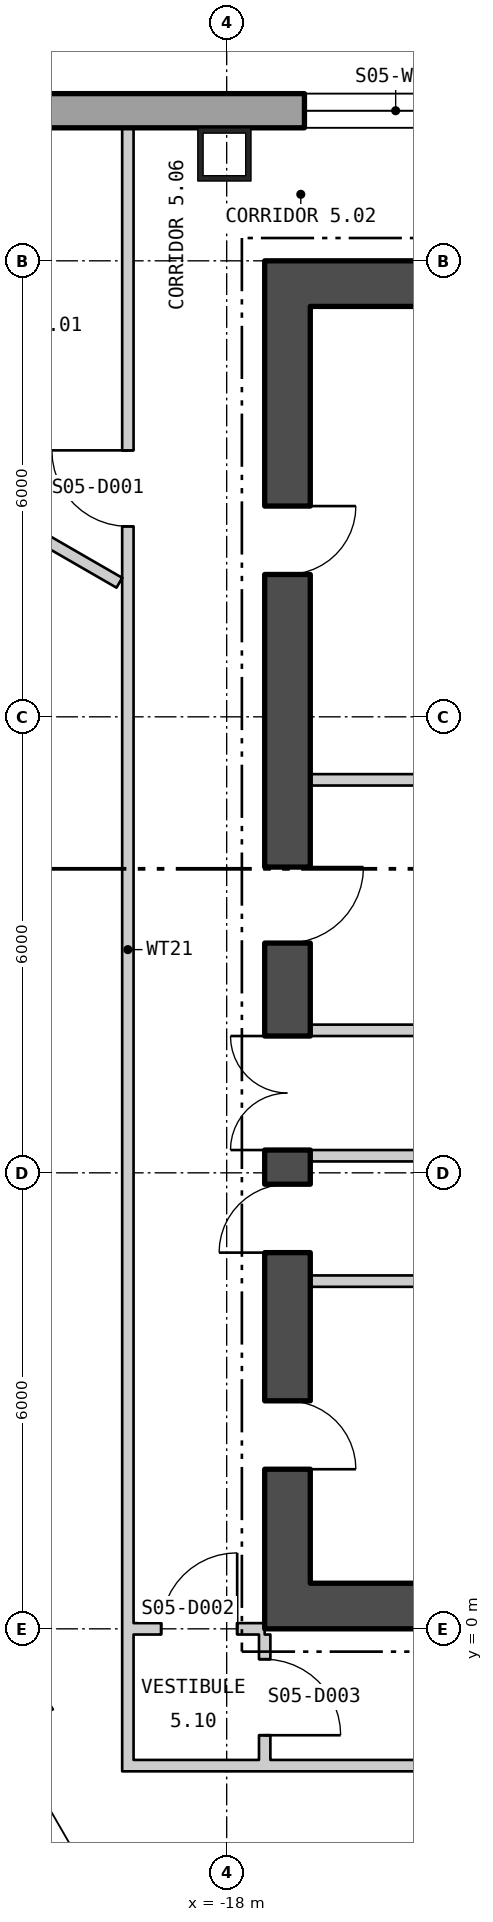
"""IFC4 building model, lengths in metres.
Left out: names, types, materials, properties, quantities, classifications, styles, units other than length and angle.
Written with IfcOpenShell. Run it as: python <this file> out.ifc"""

import sys

from ifc_helpers import new_model, si_unit, direction, frame, frame_2d, origin, origin_2d, place, context, subcontext, project, spatial, polyline, rectangle, hollow_rectangle, outline, extrude, element, fill, save


model = new_model("IFC4")
c1 = context("Model", 3, precision=1e-05, world=origin(), true_north=direction((0.0, 1.0)))
c2 = subcontext(c1, "Body", "Model", "MODEL_VIEW")
j1 = project(units=[si_unit("LENGTHUNIT", "METRE"), si_unit("PLANEANGLEUNIT", "RADIAN")], contexts=[c1])
p1 = place(None, origin())
s1 = spatial("IfcSite", under=j1, at=p1, CompositionType="ELEMENT")
p2 = place(p1, origin())
s2 = spatial("IfcBuilding", under=s1, at=p2, CompositionType="ELEMENT")
p3 = place(p2, frame((0.0, 0.0, 69.3)))
s3 = spatial("IfcBuildingStorey", under=s2, at=p3, CompositionType="ELEMENT", Elevation=69.3)
for number, where, z_axis, x_axis in (
    (1, (-18.03, 19.4, 0.0), (0.0, 0.0, 1.0), (-1.0, 0.0, 0.0)),
    (2, (-20.755, -0.934, 0.0), (0.0, 0.0, 1.0), (0.5, -0.866, 0.0)),
):
    element("IfcColumn", number, at=place(p3, frame(where, z_axis=z_axis, x_axis=x_axis)), inside=s3, PredefinedType="COLUMN", context=c2, shape_type="SweptSolid", body=[
        extrude(hollow_rectangle(XDim=0.7, YDim=0.7, WallThickness=0.07, at=origin_2d()), origin(), (0.0, 0.0, 1.0), 4.5),
    ])
p4 = place(p3, frame((22.87, 19.975, -0.4), z_axis=(0.0, 0.0, 1.0), x_axis=(-1.0, 0.0, 0.0)))
e3 = element("IfcWall", 3, at=p4, inside=s3, PredefinedType="SOLIDWALL", context=c2, shape_type="SweptSolid", body=[
    extrude(outline(polyline([(-0.13, -0.225), (45.87, -0.225), (45.61, 0.225), (0.13, 0.225), (-0.13, -0.225)])), origin(), (0.0, 0.0, 1.0), 4.5),
])
p5 = place(p4, frame((5.893, 0.0, 1.3)))
e4 = element("IfcOpeningElement", 4, at=p5, cuts=e3, PredefinedType="OPENING", context=c2, shape_type="SweptSolid", body=[
    extrude(rectangle(XDim=2.4, YDim=2.6, at=frame_2d((1.2, 1.3))), frame((0.0, 0.235, 0.0), z_axis=(0.0, -1.0, 0.0), x_axis=(1.0, 0.0, 0.0)), (0.0, 0.0, 1.0), 0.47),
])
p6 = place(p4, frame((10.401, 0.0, 1.3)))
e5 = element("IfcOpeningElement", 5, at=p6, cuts=e3, PredefinedType="OPENING", context=c2, shape_type="SweptSolid", body=[
    extrude(rectangle(XDim=2.4, YDim=2.6, at=frame_2d((1.2, 1.3))), frame((0.0, 0.235, 0.0), z_axis=(0.0, -1.0, 0.0), x_axis=(1.0, 0.0, 0.0)), (0.0, 0.0, 1.0), 0.47),
])
p7 = place(p4, frame((14.909, 0.0, 1.3)))
e6 = element("IfcOpeningElement", 6, at=p7, cuts=e3, PredefinedType="OPENING", context=c2, shape_type="SweptSolid", body=[
    extrude(rectangle(XDim=2.4, YDim=2.6, at=frame_2d((1.2, 1.3))), frame((0.0, 0.235, 0.0), z_axis=(0.0, -1.0, 0.0), x_axis=(1.0, 0.0, 0.0)), (0.0, 0.0, 1.0), 0.47),
])
p8 = place(p4, frame((19.416, 0.0, 1.3)))
e7 = element("IfcOpeningElement", 7, at=p8, cuts=e3, PredefinedType="OPENING", context=c2, shape_type="SweptSolid", body=[
    extrude(rectangle(XDim=2.4, YDim=2.6, at=frame_2d((1.2, 1.3))), frame((0.0, 0.235, 0.0), z_axis=(0.0, -1.0, 0.0), x_axis=(1.0, 0.0, 0.0)), (0.0, 0.0, 1.0), 0.47),
])
p9 = place(p4, frame((23.924, 0.0, 1.3)))
e8 = element("IfcOpeningElement", 8, at=p9, cuts=e3, PredefinedType="OPENING", context=c2, shape_type="SweptSolid", body=[
    extrude(rectangle(XDim=2.4, YDim=2.6, at=frame_2d((1.2, 1.3))), frame((0.0, 0.235, 0.0), z_axis=(0.0, -1.0, 0.0), x_axis=(1.0, 0.0, 0.0)), (0.0, 0.0, 1.0), 0.47),
])
p10 = place(p4, frame((28.431, 0.0, 1.3)))
e9 = element("IfcOpeningElement", 9, at=p10, cuts=e3, PredefinedType="OPENING", context=c2, shape_type="SweptSolid", body=[
    extrude(rectangle(XDim=2.4, YDim=2.6, at=frame_2d((1.2, 1.3))), frame((0.0, 0.235, 0.0), z_axis=(0.0, -1.0, 0.0), x_axis=(1.0, 0.0, 0.0)), (0.0, 0.0, 1.0), 0.47),
])
p11 = place(p4, frame((32.939, 0.0, 1.3)))
e10 = element("IfcOpeningElement", 10, at=p11, cuts=e3, PredefinedType="OPENING", context=c2, shape_type="SweptSolid", body=[
    extrude(rectangle(XDim=2.4, YDim=2.6, at=frame_2d((1.2, 1.3))), frame((0.0, 0.235, 0.0), z_axis=(0.0, -1.0, 0.0), x_axis=(1.0, 0.0, 0.0)), (0.0, 0.0, 1.0), 0.47),
])
p12 = place(p4, frame((37.447, 0.0, 1.3)))
e11 = element("IfcOpeningElement", 11, at=p12, cuts=e3, PredefinedType="OPENING", context=c2, shape_type="SweptSolid", body=[
    extrude(rectangle(XDim=2.4, YDim=2.6, at=frame_2d((1.2, 1.3))), frame((0.0, 0.235, 0.0), z_axis=(0.0, -1.0, 0.0), x_axis=(1.0, 0.0, 0.0)), (0.0, 0.0, 1.0), 0.47),
])
p13 = place(p3, frame((-28.18, 10.778, -0.18), z_axis=(0.0, 0.0, 1.0), x_axis=(0.500000711659, -0.866024992908, 0.0)))
e12 = element("IfcWall", 12, at=p13, inside=s3, PredefinedType="SOLIDWALL", context=c2, shape_type="SweptSolid", body=[
    extrude(outline(polyline([(-0.13, -0.225), (45.87, -0.225), (45.61, 0.225), (0.13, 0.225), (-0.13, -0.225)])), origin(), (0.0, 0.0, 1.0), 4.28),
])
p14 = place(p13, frame((1.424, 0.0, 1.08)))
e13 = element("IfcOpeningElement", 13, at=p14, cuts=e12, PredefinedType="OPENING", context=c2, shape_type="SweptSolid", body=[
    extrude(rectangle(XDim=2.4, YDim=2.6, at=frame_2d((1.2, 1.3))), frame((0.0, 0.235, 0.0), z_axis=(0.0, -1.0, 0.0), x_axis=(1.0, 0.0, 0.0)), (0.0, 0.0, 1.0), 0.47),
])
p15 = place(p13, frame((5.893, 0.0, 1.08)))
e14 = element("IfcOpeningElement", 14, at=p15, cuts=e12, PredefinedType="OPENING", context=c2, shape_type="SweptSolid", body=[
    extrude(rectangle(XDim=2.4, YDim=2.6, at=frame_2d((1.2, 1.3))), frame((0.0, 0.235, 0.0), z_axis=(0.0, -1.0, 0.0), x_axis=(1.0, 0.0, 0.0)), (0.0, 0.0, 1.0), 0.47),
])
p16 = place(p13, frame((10.401, 0.0, 1.08)))
e15 = element("IfcOpeningElement", 15, at=p16, cuts=e12, PredefinedType="OPENING", context=c2, shape_type="SweptSolid", body=[
    extrude(rectangle(XDim=2.4, YDim=2.6, at=frame_2d((1.2, 1.3))), frame((0.0, 0.235, 0.0), z_axis=(0.0, -1.0, 0.0), x_axis=(1.0, 0.0, 0.0)), (0.0, 0.0, 1.0), 0.47),
])
p17 = place(p13, frame((14.909, 0.0, 1.08)))
e16 = element("IfcOpeningElement", 16, at=p17, cuts=e12, PredefinedType="OPENING", context=c2, shape_type="SweptSolid", body=[
    extrude(rectangle(XDim=2.4, YDim=2.6, at=frame_2d((1.2, 1.3))), frame((0.0, 0.235, 0.0), z_axis=(0.0, -1.0, 0.0), x_axis=(1.0, 0.0, 0.0)), (0.0, 0.0, 1.0), 0.47),
])
p18 = place(p13, frame((19.416, 0.0, 1.08)))
e17 = element("IfcOpeningElement", 17, at=p18, cuts=e12, PredefinedType="OPENING", context=c2, shape_type="SweptSolid", body=[
    extrude(rectangle(XDim=2.4, YDim=2.6, at=frame_2d((1.2, 1.3))), frame((0.0, 0.235, 0.0), z_axis=(0.0, -1.0, 0.0), x_axis=(1.0, 0.0, 0.0)), (0.0, 0.0, 1.0), 0.47),
])
p19 = place(p13, frame((23.924, 0.0, 1.08)))
e18 = element("IfcOpeningElement", 18, at=p19, cuts=e12, PredefinedType="OPENING", context=c2, shape_type="SweptSolid", body=[
    extrude(rectangle(XDim=2.4, YDim=2.6, at=frame_2d((1.2, 1.3))), frame((0.0, 0.235, 0.0), z_axis=(0.0, -1.0, 0.0), x_axis=(1.0, 0.0, 0.0)), (0.0, 0.0, 1.0), 0.47),
])
p20 = place(p13, frame((28.431, 0.0, 1.08)))
e19 = element("IfcOpeningElement", 19, at=p20, cuts=e12, PredefinedType="OPENING", context=c2, shape_type="SweptSolid", body=[
    extrude(rectangle(XDim=2.4, YDim=2.6, at=frame_2d((1.2, 1.3))), frame((0.0, 0.235, 0.0), z_axis=(0.0, -1.0, 0.0), x_axis=(1.0, 0.0, 0.0)), (0.0, 0.0, 1.0), 0.47),
])
p21 = place(p13, frame((32.939, 0.0, 1.08)))
e20 = element("IfcOpeningElement", 20, at=p21, cuts=e12, PredefinedType="OPENING", context=c2, shape_type="SweptSolid", body=[
    extrude(rectangle(XDim=2.4, YDim=2.6, at=frame_2d((1.2, 1.3))), frame((0.0, 0.235, 0.0), z_axis=(0.0, -1.0, 0.0), x_axis=(1.0, 0.0, 0.0)), (0.0, 0.0, 1.0), 0.47),
])
p22 = place(p13, frame((37.447, 0.0, 1.08)))
e21 = element("IfcOpeningElement", 21, at=p22, cuts=e12, PredefinedType="OPENING", context=c2, shape_type="SweptSolid", body=[
    extrude(rectangle(XDim=2.4, YDim=2.6, at=frame_2d((1.2, 1.3))), frame((0.0, 0.235, 0.0), z_axis=(0.0, -1.0, 0.0), x_axis=(1.0, 0.0, 0.0)), (0.0, 0.0, 1.0), 0.47),
])
p23 = place(p13, frame((41.916, 0.0, 1.08)))
e22 = element("IfcOpeningElement", 22, at=p23, cuts=e12, PredefinedType="OPENING", context=c2, shape_type="SweptSolid", body=[
    extrude(rectangle(XDim=2.4, YDim=2.6, at=frame_2d((1.2, 1.3))), frame((0.0, 0.235, 0.0), z_axis=(0.0, -1.0, 0.0), x_axis=(1.0, 0.0, 0.0)), (0.0, 0.0, 1.0), 0.47),
])
p24 = place(p3, frame((-17.5, 0.3, 0.0), z_axis=(0.0, 0.0, 1.0), x_axis=(1.0, 0.0, 0.0)))
e23 = element("IfcWall", 23, at=p24, inside=s3, PredefinedType="SHEAR", context=c2, shape_type="SweptSolid", body=[
    extrude(rectangle(XDim=35.0, YDim=0.6, at=frame_2d((17.5, 0.0))), origin(), (0.0, 0.0, 1.0), 4.3),
])
p25 = place(p24, frame((12.0, 0.0, 0.0)))
e24 = element("IfcOpeningElement", 24, at=p25, cuts=e23, PredefinedType="OPENING", context=c2, shape_type="SweptSolid", body=[
    extrude(rectangle(XDim=1.8, YDim=2.4, at=frame_2d((0.9, 1.2))), frame((0.0, 0.31, 0.0), z_axis=(0.0, -1.0, 0.0), x_axis=(1.0, 0.0, 0.0)), (0.0, 0.0, 1.0), 0.62),
])
p26 = place(p24, frame((22.0, 0.0, 0.0)))
e25 = element("IfcOpeningElement", 25, at=p26, cuts=e23, PredefinedType="OPENING", context=c2, shape_type="SweptSolid", body=[
    extrude(rectangle(XDim=1.8, YDim=2.4, at=frame_2d((0.9, 1.2))), frame((0.0, 0.31, 0.0), z_axis=(0.0, -1.0, 0.0), x_axis=(1.0, 0.0, 0.0)), (0.0, 0.0, 1.0), 0.62),
])
p27 = place(p3, frame((-17.5, 17.7, 0.0), z_axis=(0.0, 0.0, 1.0), x_axis=(1.0, 0.0, 0.0)))
e26 = element("IfcWall", 26, at=p27, inside=s3, PredefinedType="SHEAR", context=c2, shape_type="SweptSolid", body=[
    extrude(rectangle(XDim=35.0, YDim=0.6, at=frame_2d((17.5, 0.0))), origin(), (0.0, 0.0, 1.0), 4.3),
])
p28 = place(p3, frame((-17.2, 0.6, 0.0), z_axis=(0.0, 0.0, 1.0), x_axis=(0.0, 1.0, 0.0)))
e27 = element("IfcWall", 27, at=p28, inside=s3, PredefinedType="SHEAR", context=c2, shape_type="SweptSolid", body=[
    extrude(rectangle(XDim=16.8, YDim=0.6, at=frame_2d((8.4, 0.0))), origin(), (0.0, 0.0, 1.0), 4.3),
])
p29 = place(p28, frame((5.7, 0.0, 0.0)))
e28 = element("IfcOpeningElement", 28, at=p29, cuts=e27, PredefinedType="OPENING", context=c2, shape_type="SweptSolid", body=[
    extrude(rectangle(XDim=1.5, YDim=2.1, at=frame_2d((0.75, 1.05))), frame((0.0, 0.31, 0.0), z_axis=(0.0, -1.0, 0.0), x_axis=(1.0, 0.0, 0.0)), (0.0, 0.0, 1.0), 0.62),
])
p30 = place(p28, frame((1.5, 0.0, 0.0)))
e29 = element("IfcOpeningElement", 29, at=p30, cuts=e27, PredefinedType="OPENING", context=c2, shape_type="SweptSolid", body=[
    extrude(rectangle(XDim=0.9, YDim=2.1, at=frame_2d((0.45, 1.05))), frame((0.0, 0.31, 0.0), z_axis=(0.0, -1.0, 0.0), x_axis=(1.0, 0.0, 0.0)), (0.0, 0.0, 1.0), 0.62),
])
p31 = place(p28, frame((4.35, 0.0, 0.0)))
e30 = element("IfcOpeningElement", 30, at=p31, cuts=e27, PredefinedType="OPENING", context=c2, shape_type="SweptSolid", body=[
    extrude(rectangle(XDim=0.9, YDim=2.1, at=frame_2d((0.45, 1.05))), frame((0.0, 0.31, 0.0), z_axis=(0.0, -1.0, 0.0), x_axis=(1.0, 0.0, 0.0)), (0.0, 0.0, 1.0), 0.62),
])
p32 = place(p28, frame((8.423, 0.0, 0.0)))
e31 = element("IfcOpeningElement", 31, at=p32, cuts=e27, PredefinedType="OPENING", context=c2, shape_type="SweptSolid", body=[
    extrude(rectangle(XDim=1.0, YDim=2.1, at=frame_2d((0.5, 1.05))), frame((0.0, 0.31, 0.0), z_axis=(0.0, -1.0, 0.0), x_axis=(1.0, 0.0, 0.0)), (0.0, 0.0, 1.0), 0.62),
])
p33 = place(p28, frame((13.273, 0.0, 0.0)))
e32 = element("IfcOpeningElement", 32, at=p33, cuts=e27, PredefinedType="OPENING", context=c2, shape_type="SweptSolid", body=[
    extrude(rectangle(XDim=0.9, YDim=2.1, at=frame_2d((0.45, 1.05))), frame((0.0, 0.31, 0.0), z_axis=(0.0, -1.0, 0.0), x_axis=(1.0, 0.0, 0.0)), (0.0, 0.0, 1.0), 0.62),
])
for number, where, z_axis, x_axis in (
    (33, (-16.9, 6.225, 0.0), (0.0, 0.0, 1.0), (1.0, 0.0, 0.0)),
    (34, (-16.9, 7.875, 0.0), (0.0, 0.0, 1.0), (1.0, 0.0, 0.0)),
    (35, (-16.9, 4.575, 0.0), (0.0, 0.0, 1.0), (1.0, 0.0, 0.0)),
    (36, (-16.9, 11.171, 0.0), (0.0, 0.0, 1.0), (1.0, 0.0, 0.0)),
):
    element("IfcWall", number, at=place(p3, frame(where, z_axis=z_axis, x_axis=x_axis)), inside=s3, PredefinedType="PARTITIONING", context=c2, shape_type="SweptSolid", body=[
        extrude(rectangle(XDim=2.4, YDim=0.15, at=frame_2d((1.2, 0.0))), origin(), (0.0, 0.0, 1.0), 4.3),
    ])
p34 = place(p3, frame((-24.111, 16.476, 0.0), z_axis=(0.0, 0.0, 1.0), x_axis=(0.866102723824, -0.499866053843, 0.0)))
e37 = element("IfcWall", 37, at=p34, inside=s3, PredefinedType="PARTITIONING", context=c2, shape_type="SweptSolid", body=[
    extrude(rectangle(XDim=5.426, YDim=0.15, at=frame_2d((2.713, 0.0))), origin(), (0.0, 0.0, 1.0), 4.3),
])
p35 = place(p3, frame((-19.3, -1.875, 0.0), z_axis=(0.0, 0.0, 1.0), x_axis=(0.0, 1.0, 0.0)))
e38 = element("IfcWall", 38, at=p35, inside=s3, PredefinedType="PARTITIONING", context=c2, shape_type="SweptSolid", body=[
    extrude(rectangle(XDim=21.624, YDim=0.15, at=frame_2d((10.812, 0.0))), origin(), (0.0, 0.0, 1.0), 4.3),
])
p36 = place(p35, frame((16.381, 0.0, 0.0)))
e39 = element("IfcOpeningElement", 39, at=p36, cuts=e38, PredefinedType="OPENING", context=c2, shape_type="SweptSolid", body=[
    extrude(rectangle(XDim=1.0, YDim=2.1, at=frame_2d((0.5, 1.05))), frame((0.0, 0.085, 0.0), z_axis=(0.0, -1.0, 0.0), x_axis=(1.0, 0.0, 0.0)), (0.0, 0.0, 1.0), 0.17),
])
p37 = place(p3, frame((-19.225, -1.8, 0.0), z_axis=(0.0, 0.0, 1.0), x_axis=(1.0, 0.0, 0.0)))
e40 = element("IfcWall", 40, at=p37, inside=s3, PredefinedType="PARTITIONING", context=c2, shape_type="SweptSolid", body=[
    extrude(rectangle(XDim=11.43, YDim=0.15, at=frame_2d((5.715, 0.0))), origin(), (0.0, 0.0, 1.0), 4.3),
])
p38 = place(p3, frame((-19.225, 0.0, 0.0), z_axis=(0.0, 0.0, 1.0), x_axis=(1.0, 0.0, 0.0)))
e41 = element("IfcWall", 41, at=p38, inside=s3, PredefinedType="PARTITIONING", context=c2, shape_type="SweptSolid", body=[
    extrude(rectangle(XDim=1.725, YDim=0.15, at=frame_2d((0.863, 0.0))), origin(), (0.0, 0.0, 1.0), 3.61),
])
p39 = place(p38, frame((0.363, 0.0, 0.0)))
e42 = element("IfcOpeningElement", 42, at=p39, cuts=e41, PredefinedType="OPENING", context=c2, shape_type="SweptSolid", body=[
    extrude(rectangle(XDim=1.0, YDim=2.1, at=frame_2d((0.5, 1.05))), frame((0.0, 0.085, 0.0), z_axis=(0.0, -1.0, 0.0), x_axis=(1.0, 0.0, 0.0)), (0.0, 0.0, 1.0), 0.17),
])
p40 = place(p3, frame((-17.5, -1.725, 0.0), z_axis=(0.0, 0.0, 1.0), x_axis=(0.0, 1.0, 0.0)))
e43 = element("IfcWall", 43, at=p40, inside=s3, PredefinedType="PARTITIONING", context=c2, shape_type="SweptSolid", body=[
    extrude(rectangle(XDim=1.65, YDim=0.15, at=frame_2d((0.825, 0.0))), origin(), (0.0, 0.0, 1.0), 4.3),
])
p41 = place(p40, frame((0.325, 0.0, 0.0)))
e44 = element("IfcOpeningElement", 44, at=p41, cuts=e43, PredefinedType="OPENING", context=c2, shape_type="SweptSolid", body=[
    extrude(rectangle(XDim=1.0, YDim=2.1, at=frame_2d((0.5, 1.05))), frame((0.0, 0.085, 0.0), z_axis=(0.0, -1.0, 0.0), x_axis=(1.0, 0.0, 0.0)), (0.0, 0.0, 1.0), 0.17),
])
p42 = place(p12, origin())
e45 = element("IfcWindow", 45, at=p42, inside=s3, PartitioningType="SINGLE_PANEL", PredefinedType="WINDOW", context=c2, shape_type="SweptSolid", body=[
    extrude(rectangle(XDim=2.4, YDim=2.6, at=frame_2d((1.2, 1.3))), frame((0.0, 0.105, 0.0), z_axis=(0.0, -1.0, 0.0), x_axis=(1.0, 0.0, 0.0)), (0.0, 0.0, 1.0), 0.06),
])
fill(e11, e45)
p43 = place(p17, origin())
e46 = element("IfcWindow", 46, at=p43, inside=s3, PartitioningType="SINGLE_PANEL", PredefinedType="WINDOW", context=c2, shape_type="SweptSolid", body=[
    extrude(rectangle(XDim=2.4, YDim=2.6, at=frame_2d((1.2, 1.3))), frame((0.0, 0.105, 0.0), z_axis=(0.0, -1.0, 0.0), x_axis=(1.0, 0.0, 0.0)), (0.0, 0.0, 1.0), 0.06),
])
fill(e16, e46)
p44 = place(p29, origin())
e47 = element("IfcDoor", 47, at=p44, inside=s3, OperationType="DOUBLE_DOOR_SINGLE_SWING", PredefinedType="DOOR", context=c2, shape_type="SweptSolid", body=[
    extrude(rectangle(XDim=1.5, YDim=2.1, at=frame_2d((0.75, 1.05))), frame((0.0, 0.025, 0.0), z_axis=(0.0, -1.0, 0.0), x_axis=(1.0, 0.0, 0.0)), (0.0, 0.0, 1.0), 0.05),
])
fill(e28, e47)
p45 = place(p30, origin())
e48 = element("IfcDoor", 48, at=p45, inside=s3, OperationType="SINGLE_SWING_LEFT", PredefinedType="DOOR", context=c2, shape_type="SweptSolid", body=[
    extrude(rectangle(XDim=0.9, YDim=2.1, at=frame_2d((0.45, 1.05))), frame((0.0, 0.025, 0.0), z_axis=(0.0, -1.0, 0.0), x_axis=(1.0, 0.0, 0.0)), (0.0, 0.0, 1.0), 0.05),
])
fill(e29, e48)
p46 = place(p31, origin())
e49 = element("IfcDoor", 49, at=p46, inside=s3, OperationType="SINGLE_SWING_RIGHT", PredefinedType="DOOR", context=c2, shape_type="SweptSolid", body=[
    extrude(rectangle(XDim=0.9, YDim=2.1, at=frame_2d((0.45, 1.05))), frame((0.0, 0.025, 0.0), z_axis=(0.0, -1.0, 0.0), x_axis=(1.0, 0.0, 0.0)), (0.0, 0.0, 1.0), 0.05),
])
fill(e30, e49)
p47 = place(p32, origin())
e50 = element("IfcDoor", 50, at=p47, inside=s3, OperationType="SINGLE_SWING_RIGHT", PredefinedType="DOOR", context=c2, shape_type="SweptSolid", body=[
    extrude(rectangle(XDim=1.0, YDim=2.1, at=frame_2d((0.5, 1.05))), frame((0.0, 0.025, 0.0), z_axis=(0.0, -1.0, 0.0), x_axis=(1.0, 0.0, 0.0)), (0.0, 0.0, 1.0), 0.05),
])
fill(e31, e50)
p48 = place(p33, origin())
e51 = element("IfcDoor", 51, at=p48, inside=s3, OperationType="SINGLE_SWING_RIGHT", PredefinedType="DOOR", context=c2, shape_type="SweptSolid", body=[
    extrude(rectangle(XDim=0.9, YDim=2.1, at=frame_2d((0.45, 1.05))), frame((0.0, 0.025, 0.0), z_axis=(0.0, -1.0, 0.0), x_axis=(1.0, 0.0, 0.0)), (0.0, 0.0, 1.0), 0.05),
])
fill(e32, e51)
p49 = place(p36, origin())
e52 = element("IfcDoor", 52, at=p49, inside=s3, OperationType="SINGLE_SWING_LEFT", PredefinedType="DOOR", context=c2, shape_type="SweptSolid", body=[
    extrude(rectangle(XDim=1.0, YDim=2.1, at=frame_2d((0.5, 1.05))), frame((0.0, 0.025, 0.0), z_axis=(0.0, -1.0, 0.0), x_axis=(1.0, 0.0, 0.0)), (0.0, 0.0, 1.0), 0.05),
])
fill(e39, e52)
p50 = place(p39, origin())
e53 = element("IfcDoor", 53, at=p50, inside=s3, OperationType="SINGLE_SWING_LEFT", PredefinedType="DOOR", context=c2, shape_type="SweptSolid", body=[
    extrude(rectangle(XDim=1.0, YDim=2.1, at=frame_2d((0.5, 1.05))), frame((0.0, 0.025, 0.0), z_axis=(0.0, -1.0, 0.0), x_axis=(1.0, 0.0, 0.0)), (0.0, 0.0, 1.0), 0.05),
])
fill(e42, e53)
p51 = place(p41, origin())
e54 = element("IfcDoor", 54, at=p51, inside=s3, OperationType="SINGLE_SWING_LEFT", PredefinedType="DOOR", context=c2, shape_type="SweptSolid", body=[
    extrude(rectangle(XDim=1.0, YDim=2.1, at=frame_2d((0.5, 1.05))), frame((0.0, 0.025, 0.0), z_axis=(0.0, -1.0, 0.0), x_axis=(1.0, 0.0, 0.0)), (0.0, 0.0, 1.0), 0.05),
])
fill(e44, e54)
save(model, sys.argv[1])
